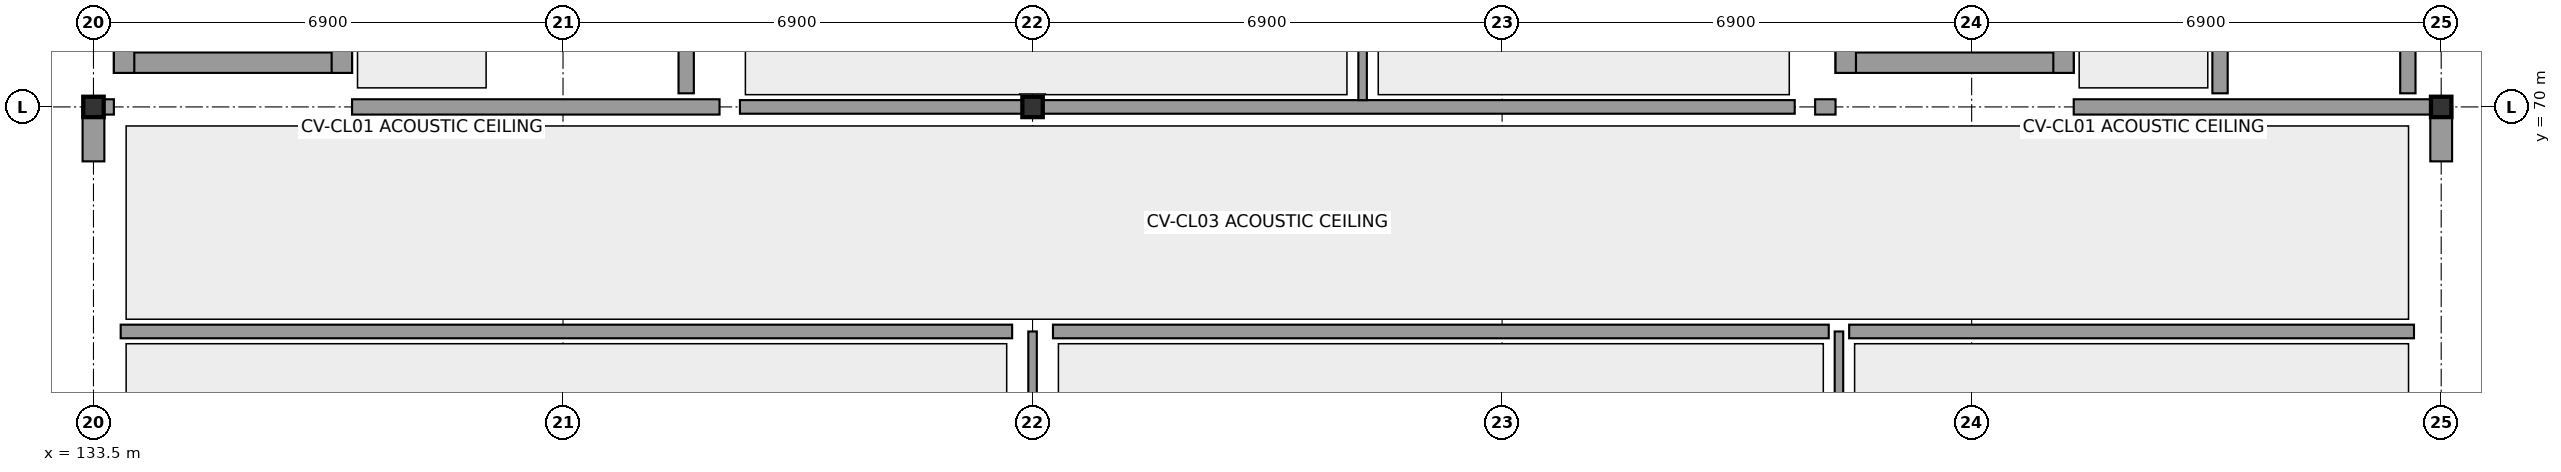
"""IFC4 building model, lengths in metres.
Left out: names, types, materials, properties, quantities, classifications, styles, units other than length and angle.
Written with IfcOpenShell. Run it as: python <this file> out.ifc"""

import sys

from ifc_helpers import new_model, si_unit, direction, frame, frame_2d, origin, origin_with_axes, origin_2d, place, context, subcontext, project, spatial, rectangle, i_section, extrude, element, fill, save


model = new_model("IFC4")
c1 = context("Model", 3, precision=1e-05, world=origin(), true_north=direction((0.0, 1.0)))
c2 = subcontext(c1, "Body", "Model", "MODEL_VIEW")
j1 = project(units=[si_unit("LENGTHUNIT", "METRE"), si_unit("PLANEANGLEUNIT", "RADIAN")], contexts=[c1])
p1 = place(None, origin())
s1 = spatial("IfcSite", under=j1, at=p1, CompositionType="ELEMENT")
p2 = place(p1, origin())
s2 = spatial("IfcBuilding", under=s1, at=p2, CompositionType="ELEMENT")
p3 = place(p2, origin())
s3 = spatial("IfcBuildingStorey", under=s2, at=p3, CompositionType="ELEMENT", Elevation=0.0)
for number, where, z_axis, x_axis in (
    (1, (133.5, 70.0, 0.0), (0.0, 0.0, 1.0), (1.0, 0.0, 0.0)),
    (2, (147.3, 70.0, 0.0), (0.0, 0.0, 1.0), (1.0, 0.0, 0.0)),
    (3, (168.0, 70.0, 0.0), (0.0, 0.0, 1.0), (1.0, 0.0, 0.0)),
):
    element("IfcColumn", number, at=place(p3, frame(where, z_axis=z_axis, x_axis=x_axis)), inside=s3, PredefinedType="COLUMN", context=c2, shape_type="SweptSolid", body=[
        extrude(i_section(OverallWidth=0.3, OverallDepth=0.3, WebThickness=0.011, FlangeThickness=0.019, at=origin_2d()), origin(), (0.0, 0.0, 1.0), 4.4),
    ])
for number, where, z_axis, x_axis in (
    (4, (133.5, 69.2, 0.0), (0.0, 0.0, 1.0), (0.0, 1.0, 0.0)),
    (5, (168.0, 69.2, 0.0), (0.0, 0.0, 1.0), (0.0, 1.0, 0.0)),
):
    element("IfcWall", number, at=place(p3, frame(where, z_axis=z_axis, x_axis=x_axis)), inside=s3, PredefinedType="STANDARD", context=c2, shape_type="SweptSolid", body=[
        extrude(rectangle(XDim=0.8, YDim=0.32, at=frame_2d((0.4, 0.0))), origin(), (0.0, 0.0, 1.0), 3.66),
    ])
p4 = place(p3, frame((133.8, 70.65, 0.0), z_axis=(0.0, 0.0, 1.0), x_axis=(1.0, 0.0, 0.0)))
e6 = element("IfcWall", 6, at=p4, inside=s3, PredefinedType="SHEAR", context=c2, shape_type="SweptSolid", body=[
    extrude(rectangle(XDim=3.5, YDim=0.3, at=frame_2d((1.75, 0.0))), origin(), (0.0, 0.0, 1.0), 4.12),
])
p5 = place(p3, frame((133.95, 70.5, 0.0), z_axis=(0.0, 0.0, 1.0), x_axis=(0.0, 1.0, 0.0)))
e7 = element("IfcWall", 7, at=p5, inside=s3, PredefinedType="SHEAR", context=c2, shape_type="SweptSolid", body=[
    extrude(rectangle(XDim=7.5, YDim=0.3, at=frame_2d((3.75, 0.0))), origin(), (0.0, 0.0, 1.0), 4.12),
])
p6 = place(p3, frame((137.15, 70.5, 0.0), z_axis=(0.0, 0.0, 1.0), x_axis=(0.0, 1.0, 0.0)))
e8 = element("IfcWall", 8, at=p6, inside=s3, PredefinedType="SHEAR", context=c2, shape_type="SweptSolid", body=[
    extrude(rectangle(XDim=7.5, YDim=0.3, at=frame_2d((3.75, 0.0))), origin(), (0.0, 0.0, 1.0), 4.12),
])
p7 = place(p6, frame((5.7, 0.0, 0.0)))
e9 = element("IfcOpeningElement", 9, at=p7, cuts=e8, PredefinedType="OPENING", context=c2, shape_type="SweptSolid", body=[
    extrude(rectangle(XDim=1.15, YDim=2.15, at=frame_2d((0.575, 1.075))), frame((0.0, 0.162, 0.0), z_axis=(0.0, -1.0, 0.0), x_axis=(1.0, 0.0, 0.0)), (0.0, 0.0, 1.0), 0.324),
])
p8 = place(p3, frame((142.21, 70.2, 0.0), z_axis=(0.0, 0.0, 1.0), x_axis=(0.0, 1.0, 0.0)))
e10 = element("IfcWall", 10, at=p8, inside=s3, PredefinedType="PARTITIONING", context=c2, shape_type="SweptSolid", body=[
    extrude(rectangle(XDim=7.6, YDim=0.225, at=frame_2d((3.8, 0.0))), origin(), (0.0, 0.0, 1.0), 4.12),
])
p9 = place(p3, frame((133.65, 70.0, 0.0), z_axis=(0.0, 0.0, 1.0), x_axis=(1.0, 0.0, 0.0)))
e11 = element("IfcWall", 11, at=p9, inside=s3, PredefinedType="PARTITIONING", context=c2, shape_type="SweptSolid", body=[
    extrude(rectangle(XDim=0.15, YDim=0.225, at=frame_2d((0.075, 0.0))), origin(), (0.0, 0.0, 1.0), 4.12),
])
p10 = place(p3, frame((137.3, 70.0, 0.0), z_axis=(0.0, 0.0, 1.0), x_axis=(1.0, 0.0, 0.0)))
e12 = element("IfcWall", 12, at=p10, inside=s3, PredefinedType="PARTITIONING", context=c2, shape_type="SweptSolid", body=[
    extrude(rectangle(XDim=5.4, YDim=0.225, at=frame_2d((2.7, 0.0))), origin(), (0.0, 0.0, 1.0), 3.67),
])
p11 = place(p10, frame((0.475, 0.0, 0.0)))
e13 = element("IfcOpeningElement", 13, at=p11, cuts=e12, PredefinedType="OPENING", context=c2, shape_type="SweptSolid", body=[
    extrude(rectangle(XDim=1.1, YDim=2.15, at=frame_2d((0.55, 1.075))), frame((0.0, 0.125, 0.0), z_axis=(0.0, -1.0, 0.0), x_axis=(1.0, 0.0, 0.0)), (0.0, 0.0, 1.0), 0.249),
])
p12 = place(p3, frame((159.1, 70.65, 0.0), z_axis=(0.0, 0.0, 1.0), x_axis=(1.0, 0.0, 0.0)))
e14 = element("IfcWall", 14, at=p12, inside=s3, PredefinedType="SHEAR", context=c2, shape_type="SweptSolid", body=[
    extrude(rectangle(XDim=3.5, YDim=0.3, at=frame_2d((1.75, 0.0))), origin(), (0.0, 0.0, 1.0), 4.12),
])
p13 = place(p3, frame((159.25, 70.5, 0.0), z_axis=(0.0, 0.0, 1.0), x_axis=(0.0, 1.0, 0.0)))
e15 = element("IfcWall", 15, at=p13, inside=s3, PredefinedType="SHEAR", context=c2, shape_type="SweptSolid", body=[
    extrude(rectangle(XDim=7.5, YDim=0.3, at=frame_2d((3.75, 0.0))), origin(), (0.0, 0.0, 1.0), 4.12),
])
p14 = place(p3, frame((162.45, 70.5, 0.0), z_axis=(0.0, 0.0, 1.0), x_axis=(0.0, 1.0, 0.0)))
e16 = element("IfcWall", 16, at=p14, inside=s3, PredefinedType="SHEAR", context=c2, shape_type="SweptSolid", body=[
    extrude(rectangle(XDim=7.5, YDim=0.3, at=frame_2d((3.75, 0.0))), origin(), (0.0, 0.0, 1.0), 4.12),
])
p15 = place(p14, frame((5.7, 0.0, 0.0)))
e17 = element("IfcOpeningElement", 17, at=p15, cuts=e16, PredefinedType="OPENING", context=c2, shape_type="SweptSolid", body=[
    extrude(rectangle(XDim=1.15, YDim=2.15, at=frame_2d((0.575, 1.075))), frame((0.0, 0.162, 0.0), z_axis=(0.0, -1.0, 0.0), x_axis=(1.0, 0.0, 0.0)), (0.0, 0.0, 1.0), 0.324),
])
p16 = place(p3, frame((167.51, 70.2, 0.0), z_axis=(0.0, 0.0, 1.0), x_axis=(0.0, 1.0, 0.0)))
e18 = element("IfcWall", 18, at=p16, inside=s3, PredefinedType="PARTITIONING", context=c2, shape_type="SweptSolid", body=[
    extrude(rectangle(XDim=7.6, YDim=0.225, at=frame_2d((3.8, 0.0))), origin(), (0.0, 0.0, 1.0), 4.12),
])
p17 = place(p3, frame((164.75, 70.2, 0.0), z_axis=(0.0, 0.0, 1.0), x_axis=(0.0, 1.0, 0.0)))
e19 = element("IfcWall", 19, at=p17, inside=s3, PredefinedType="PARTITIONING", context=c2, shape_type="SweptSolid", body=[
    extrude(rectangle(XDim=3.8, YDim=0.225, at=frame_2d((1.9, 0.0))), origin(), (0.0, 0.0, 1.0), 4.12),
])
p18 = place(p3, frame((158.8, 70.0, 0.0), z_axis=(0.0, 0.0, 1.0), x_axis=(1.0, 0.0, 0.0)))
e20 = element("IfcWall", 20, at=p18, inside=s3, PredefinedType="PARTITIONING", context=c2, shape_type="SweptSolid", body=[
    extrude(rectangle(XDim=0.3, YDim=0.225, at=frame_2d((0.15, 0.0))), origin(), (0.0, 0.0, 1.0), 4.12),
])
p19 = place(p3, frame((162.6, 70.0, 0.0), z_axis=(0.0, 0.0, 1.0), x_axis=(1.0, 0.0, 0.0)))
e21 = element("IfcWall", 21, at=p19, inside=s3, PredefinedType="PARTITIONING", context=c2, shape_type="SweptSolid", body=[
    extrude(rectangle(XDim=5.25, YDim=0.225, at=frame_2d((2.625, 0.0))), origin(), (0.0, 0.0, 1.0), 3.57),
])
p20 = place(p19, frame((0.475, 0.0, 0.0)))
e22 = element("IfcOpeningElement", 22, at=p20, cuts=e21, PredefinedType="OPENING", context=c2, shape_type="SweptSolid", body=[
    extrude(rectangle(XDim=1.1, YDim=2.15, at=frame_2d((0.55, 1.075))), frame((0.0, 0.125, 0.0), z_axis=(0.0, -1.0, 0.0), x_axis=(1.0, 0.0, 0.0)), (0.0, 0.0, 1.0), 0.249),
])
p21 = place(p3, frame((133.9, 66.7, 0.0), z_axis=(0.0, 0.0, 1.0), x_axis=(1.0, 0.0, 0.0)))
e23 = element("IfcWall", 23, at=p21, inside=s3, PredefinedType="PARTITIONING", context=c2, shape_type="SweptSolid", body=[
    extrude(rectangle(XDim=13.1, YDim=0.2, at=frame_2d((6.55, 0.0))), origin(), (0.0, 0.0, 1.0), 4.12),
])
p22 = place(p21, frame((5.1, 0.0, 0.0)))
e24 = element("IfcOpeningElement", 24, at=p22, cuts=e23, PredefinedType="OPENING", context=c2, shape_type="SweptSolid", body=[
    extrude(rectangle(XDim=1.0, YDim=2.15, at=frame_2d((0.5, 1.075))), frame((0.0, 0.112, 0.0), z_axis=(0.0, -1.0, 0.0), x_axis=(1.0, 0.0, 0.0)), (0.0, 0.0, 1.0), 0.224),
])
p23 = place(p3, frame((147.6, 66.7, 0.0), z_axis=(0.0, 0.0, 1.0), x_axis=(1.0, 0.0, 0.0)))
e25 = element("IfcWall", 25, at=p23, inside=s3, PredefinedType="PARTITIONING", context=c2, shape_type="SweptSolid", body=[
    extrude(rectangle(XDim=11.4, YDim=0.2, at=frame_2d((5.7, 0.0))), origin(), (0.0, 0.0, 1.0), 4.12),
])
p24 = place(p23, frame((4.4, 0.0, 0.0)))
e26 = element("IfcOpeningElement", 26, at=p24, cuts=e25, PredefinedType="OPENING", context=c2, shape_type="SweptSolid", body=[
    extrude(rectangle(XDim=1.0, YDim=2.15, at=frame_2d((0.5, 1.075))), frame((0.0, 0.112, 0.0), z_axis=(0.0, -1.0, 0.0), x_axis=(1.0, 0.0, 0.0)), (0.0, 0.0, 1.0), 0.224),
])
p25 = place(p3, frame((159.3, 66.7, 0.0), z_axis=(0.0, 0.0, 1.0), x_axis=(1.0, 0.0, 0.0)))
e27 = element("IfcWall", 27, at=p25, inside=s3, PredefinedType="PARTITIONING", context=c2, shape_type="SweptSolid", body=[
    extrude(rectangle(XDim=8.3, YDim=0.2, at=frame_2d((4.15, 0.0))), origin(), (0.0, 0.0, 1.0), 4.12),
])
p26 = place(p25, frame((2.7, 0.0, 0.0)))
e28 = element("IfcOpeningElement", 28, at=p26, cuts=e27, PredefinedType="OPENING", context=c2, shape_type="SweptSolid", body=[
    extrude(rectangle(XDim=1.0, YDim=2.15, at=frame_2d((0.5, 1.075))), frame((0.0, 0.112, 0.0), z_axis=(0.0, -1.0, 0.0), x_axis=(1.0, 0.0, 0.0)), (0.0, 0.0, 1.0), 0.224),
])
p27 = place(p3, frame((147.3, 54.1, 0.0), z_axis=(0.0, 0.0, 1.0), x_axis=(0.0, 1.0, 0.0)))
e29 = element("IfcWall", 29, at=p27, inside=s3, PredefinedType="PARTITIONING", context=c2, shape_type="SweptSolid", body=[
    extrude(rectangle(XDim=12.6, YDim=0.125, at=frame_2d((6.3, 0.0))), origin(), (0.0, 0.0, 1.0), 3.66),
])
p28 = place(p3, frame((159.15, 54.1, 0.0), z_axis=(0.0, 0.0, 1.0), x_axis=(0.0, 1.0, 0.0)))
e30 = element("IfcWall", 30, at=p28, inside=s3, PredefinedType="PARTITIONING", context=c2, shape_type="SweptSolid", body=[
    extrude(rectangle(XDim=12.6, YDim=0.125, at=frame_2d((6.3, 0.0))), origin(), (0.0, 0.0, 1.0), 4.12),
])
p29 = place(p3, frame((143.0, 70.0, 0.0), z_axis=(0.0, 0.0, 1.0), x_axis=(1.0, 0.0, 0.0)))
e31 = element("IfcWall", 31, at=p29, inside=s3, PredefinedType="PARTITIONING", context=c2, shape_type="SweptSolid", body=[
    extrude(rectangle(XDim=15.5, YDim=0.2, at=frame_2d((7.75, 0.0))), origin(), (0.0, 0.0, 1.0), 3.57),
])
p30 = place(p29, frame((1.8, 0.0, 0.0)))
e32 = element("IfcOpeningElement", 32, at=p30, cuts=e31, PredefinedType="OPENING", context=c2, shape_type="SweptSolid", body=[
    extrude(rectangle(XDim=0.95, YDim=2.15, at=frame_2d((0.475, 1.075))), frame((0.0, 0.112, 0.0), z_axis=(0.0, -1.0, 0.0), x_axis=(1.0, 0.0, 0.0)), (0.0, 0.0, 1.0), 0.224),
])
p31 = place(p29, frame((10.5, 0.0, 0.0)))
e33 = element("IfcOpeningElement", 33, at=p31, cuts=e31, PredefinedType="OPENING", context=c2, shape_type="SweptSolid", body=[
    extrude(rectangle(XDim=0.95, YDim=2.15, at=frame_2d((0.475, 1.075))), frame((0.0, 0.112, 0.0), z_axis=(0.0, -1.0, 0.0), x_axis=(1.0, 0.0, 0.0)), (0.0, 0.0, 1.0), 0.224),
])
p32 = place(p3, frame((152.15, 70.1, 0.0), z_axis=(0.0, 0.0, 1.0), x_axis=(0.0, 1.0, 0.0)))
e34 = element("IfcWall", 34, at=p32, inside=s3, PredefinedType="PARTITIONING", context=c2, shape_type="SweptSolid", body=[
    extrude(rectangle(XDim=7.6, YDim=0.125, at=frame_2d((3.8, 0.0))), origin(), (0.0, 0.0, 1.0), 4.12),
])
p33 = place(p11, origin_with_axes())
e35 = element("IfcDoor", 35, at=p33, inside=s3, OperationType="SINGLE_SWING_LEFT", PredefinedType="DOOR", context=c2, shape_type="SweptSolid", body=[
    extrude(rectangle(XDim=1.1, YDim=2.15, at=frame_2d((0.55, 1.075))), frame((0.0, 0.025, 0.0), z_axis=(0.0, -1.0, 0.0), x_axis=(1.0, 0.0, 0.0)), (0.0, 0.0, 1.0), 0.05),
])
fill(e13, e35)
p34 = place(p20, origin_with_axes())
e36 = element("IfcDoor", 36, at=p34, inside=s3, OperationType="SINGLE_SWING_RIGHT", PredefinedType="DOOR", context=c2, shape_type="SweptSolid", body=[
    extrude(rectangle(XDim=1.1, YDim=2.15, at=frame_2d((0.55, 1.075))), frame((0.0, 0.025, 0.0), z_axis=(0.0, -1.0, 0.0), x_axis=(1.0, 0.0, 0.0)), (0.0, 0.0, 1.0), 0.05),
])
fill(e22, e36)
p35 = place(p22, origin_with_axes())
e37 = element("IfcDoor", 37, at=p35, inside=s3, OperationType="SINGLE_SWING_RIGHT", PredefinedType="DOOR", context=c2, shape_type="SweptSolid", body=[
    extrude(rectangle(XDim=1.0, YDim=2.15, at=frame_2d((0.5, 1.075))), frame((0.0, 0.025, 0.0), z_axis=(0.0, -1.0, 0.0), x_axis=(1.0, 0.0, 0.0)), (0.0, 0.0, 1.0), 0.05),
])
fill(e24, e37)
p36 = place(p24, frame((1.0, 0.0, 0.0), z_axis=(0.0, 0.0, 1.0), x_axis=(-1.0, 0.0, 0.0)))
e38 = element("IfcDoor", 38, at=p36, inside=s3, OperationType="SINGLE_SWING_RIGHT", PredefinedType="DOOR", context=c2, shape_type="SweptSolid", body=[
    extrude(rectangle(XDim=1.0, YDim=2.15, at=frame_2d((0.5, 1.075))), frame((0.0, 0.025, 0.0), z_axis=(0.0, -1.0, 0.0), x_axis=(1.0, 0.0, 0.0)), (0.0, 0.0, 1.0), 0.05),
])
fill(e26, e38)
p37 = place(p26, origin_with_axes())
e39 = element("IfcDoor", 39, at=p37, inside=s3, OperationType="SINGLE_SWING_RIGHT", PredefinedType="DOOR", context=c2, shape_type="SweptSolid", body=[
    extrude(rectangle(XDim=1.0, YDim=2.15, at=frame_2d((0.5, 1.075))), frame((0.0, 0.025, 0.0), z_axis=(0.0, -1.0, 0.0), x_axis=(1.0, 0.0, 0.0)), (0.0, 0.0, 1.0), 0.05),
])
fill(e28, e39)
p38 = place(p30, origin_with_axes())
e40 = element("IfcDoor", 40, at=p38, inside=s3, OperationType="SINGLE_SWING_LEFT", PredefinedType="DOOR", context=c2, shape_type="SweptSolid", body=[
    extrude(rectangle(XDim=0.95, YDim=2.15, at=frame_2d((0.475, 1.075))), frame((0.0, 0.025, 0.0), z_axis=(0.0, -1.0, 0.0), x_axis=(1.0, 0.0, 0.0)), (0.0, 0.0, 1.0), 0.05),
])
fill(e32, e40)
p39 = place(p31, frame((0.95, 0.0, 0.0), z_axis=(0.0, 0.0, 1.0), x_axis=(-1.0, 0.0, 0.0)))
e41 = element("IfcDoor", 41, at=p39, inside=s3, OperationType="SINGLE_SWING_RIGHT", PredefinedType="DOOR", context=c2, shape_type="SweptSolid", body=[
    extrude(rectangle(XDim=0.95, YDim=2.15, at=frame_2d((0.475, 1.075))), frame((0.0, 0.025, 0.0), z_axis=(0.0, -1.0, 0.0), x_axis=(1.0, 0.0, 0.0)), (0.0, 0.0, 1.0), 0.05),
])
fill(e33, e41)
save(model, sys.argv[1])
